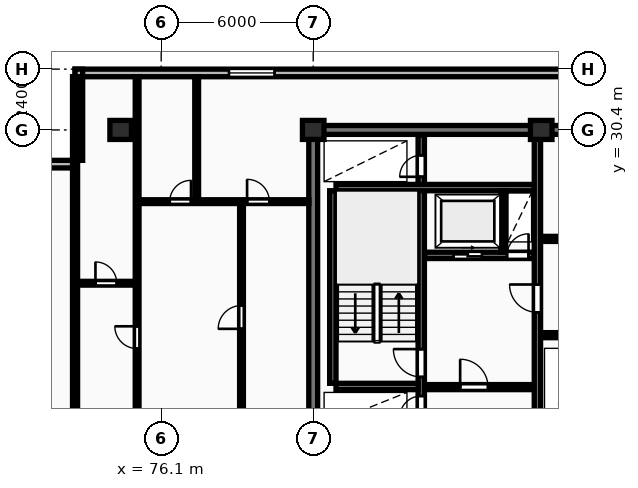
"""IFC4 building model, lengths in metres.
Left out: names, types, materials, properties, quantities, classifications, styles, units other than length and angle.
Written with IfcOpenShell. Run it as: python <this file> out.ifc"""

import sys

from ifc_helpers import new_model, si_unit, direction, frame, frame_2d, origin, origin_2d, place, context, subcontext, project, spatial, rectangle, extrude, element, fill, save


model = new_model("IFC4")
c1 = context("Model", 3, precision=1e-05, world=origin(), true_north=direction((0.0, 1.0)))
c2 = subcontext(c1, "Body", "Model", "MODEL_VIEW")
j1 = project(units=[si_unit("LENGTHUNIT", "METRE"), si_unit("PLANEANGLEUNIT", "RADIAN")], contexts=[c1])
p1 = place(None, origin())
s1 = spatial("IfcSite", under=j1, at=p1, CompositionType="ELEMENT")
p2 = place(p1, origin())
s2 = spatial("IfcBuilding", under=s1, at=p2, CompositionType="ELEMENT")
p3 = place(p2, frame((0.0, 0.0, 106.8)))
s3 = spatial("IfcBuildingStorey", under=s2, at=p3, CompositionType="ELEMENT", Elevation=106.8)
for number, where, z_axis, x_axis in (
    (1, (74.5, 30.4, 0.0), (0.0, 0.0, 1.0), (1.0, 0.0, 0.0)),
    (2, (82.1, 30.4, 0.0), (0.0, 0.0, 1.0), (1.0, 0.0, 0.0)),
    (3, (91.1, 30.4, 0.0), (0.0, 0.0, 1.0), (1.0, 0.0, 0.0)),
):
    element("IfcColumn", number, at=place(p3, frame(where, z_axis=z_axis, x_axis=x_axis)), inside=s3, PredefinedType="COLUMN", context=c2, shape_type="SweptSolid", body=[
        extrude(rectangle(XDim=0.85, YDim=0.75, at=origin_2d()), origin(), (0.0, 0.0, 1.0), 3.25),
    ])
p4 = place(p3, frame((130.7, 32.65, 0.0), z_axis=(0.0, 0.0, 1.0), x_axis=(-1.0, 0.0, 0.0)))
e4 = element("IfcWall", 4, at=p4, inside=s3, PredefinedType="STANDARD", context=c2, shape_type="SweptSolid", body=[
    extrude(rectangle(XDim=58.0, YDim=0.3, at=frame_2d((29.0, 0.0))), origin(), (0.0, 0.0, 1.0), 2.97),
])
p5 = place(p4, frame((50.125, 0.0, 0.85)))
e5 = element("IfcOpeningElement", 5, at=p5, cuts=e4, PredefinedType="OPENING", context=c2, shape_type="SweptSolid", body=[
    extrude(rectangle(XDim=1.8, YDim=1.8, at=frame_2d((0.9, 0.9))), frame((0.0, 0.16, 0.0), z_axis=(0.0, -1.0, 0.0), x_axis=(1.0, 0.0, 0.0)), (0.0, 0.0, 1.0), 0.32),
])
p6 = place(p4, frame((6.775, 0.0, 0.85)))
e6 = element("IfcOpeningElement", 6, at=p6, cuts=e4, PredefinedType="OPENING", context=c2, shape_type="SweptSolid", body=[
    extrude(rectangle(XDim=1.8, YDim=1.8, at=frame_2d((0.9, 0.9))), frame((0.0, 0.16, 0.0), z_axis=(0.0, -1.0, 0.0), x_axis=(1.0, 0.0, 0.0)), (0.0, 0.0, 1.0), 0.32),
])
p7 = place(p3, frame((72.85, 32.8, 0.0), z_axis=(0.0, 0.0, 1.0), x_axis=(0.0, -1.0, 0.0)))
e7 = element("IfcWall", 7, at=p7, inside=s3, PredefinedType="STANDARD", context=c2, shape_type="SweptSolid", body=[
    extrude(rectangle(XDim=3.6, YDim=0.3, at=frame_2d((1.8, 0.0))), origin(), (0.0, 0.0, 1.0), 2.97),
])
p8 = place(p3, frame((72.7, 29.05, 0.0), z_axis=(0.0, 0.0, 1.0), x_axis=(-1.0, 0.0, 0.0)))
e8 = element("IfcWall", 8, at=p8, inside=s3, PredefinedType="STANDARD", context=c2, shape_type="SweptSolid", body=[
    extrude(rectangle(XDim=3.6, YDim=0.3, at=frame_2d((1.8, 0.0))), origin(), (0.0, 0.0, 1.0), 2.97),
])
p9 = place(p3, frame((81.925, 30.4, 0.0), z_axis=(0.0, 0.0, 1.0), x_axis=(1.0, 0.0, 0.0)))
e9 = element("IfcWall", 9, at=p9, inside=s3, PredefinedType="SHEAR", context=c2, shape_type="SweptSolid", body=[
    extrude(rectangle(XDim=36.265, YDim=0.35, at=frame_2d((18.132, 0.0))), origin(), (0.0, 0.0, 1.0), 3.25),
])
p10 = place(p3, frame((82.1, 18.575, 0.0), z_axis=(0.0, 0.0, 1.0), x_axis=(0.0, 1.0, 0.0)))
e10 = element("IfcWall", 10, at=p10, inside=s3, PredefinedType="SHEAR", context=c2, shape_type="SweptSolid", body=[
    extrude(rectangle(XDim=11.65, YDim=0.35, at=frame_2d((5.825, 0.0))), origin(), (0.0, 0.0, 1.0), 3.25),
])
p11 = place(p3, frame((82.875, 20.4, 0.0), z_axis=(0.0, 0.0, 1.0), x_axis=(0.0, 1.0, 0.0)))
e11 = element("IfcWall", 11, at=p11, inside=s3, PredefinedType="SHEAR", context=c2, shape_type="SweptSolid", body=[
    extrude(rectangle(XDim=7.6, YDim=0.25, at=frame_2d((3.8, 0.0))), origin(), (0.0, 0.0, 1.0), 3.25),
])
p12 = place(p3, frame((86.365, 18.6, 0.0), z_axis=(0.0, 0.0, 1.0), x_axis=(0.0, 1.0, 0.0)))
e12 = element("IfcWall", 12, at=p12, inside=s3, PredefinedType="SHEAR", context=c2, shape_type="SweptSolid", body=[
    extrude(rectangle(XDim=11.6, YDim=0.25, at=frame_2d((5.8, 0.0))), origin(), (0.0, 0.0, 1.0), 3.25),
])
p13 = place(p12, frame((0.45, 0.0, 0.0)))
e13 = element("IfcOpeningElement", 13, at=p13, cuts=e12, PredefinedType="OPENING", context=c2, shape_type="SweptSolid", body=[
    extrude(rectangle(XDim=0.85, YDim=2.05, at=frame_2d((0.425, 1.025))), frame((0.0, 0.135, 0.0), z_axis=(0.0, -1.0, 0.0), x_axis=(1.0, 0.0, 0.0)), (0.0, 0.0, 1.0), 0.27),
])
p14 = place(p12, frame((2.05, 0.0, 0.0)))
e14 = element("IfcOpeningElement", 14, at=p14, cuts=e12, PredefinedType="OPENING", context=c2, shape_type="SweptSolid", body=[
    extrude(rectangle(XDim=1.1, YDim=2.1, at=frame_2d((0.55, 1.05))), frame((0.0, 0.135, 0.0), z_axis=(0.0, -1.0, 0.0), x_axis=(1.0, 0.0, 0.0)), (0.0, 0.0, 1.0), 0.27),
])
p15 = place(p12, frame((9.95, 0.0, 0.0)))
e15 = element("IfcOpeningElement", 15, at=p15, cuts=e12, PredefinedType="OPENING", context=c2, shape_type="SweptSolid", body=[
    extrude(rectangle(XDim=0.85, YDim=2.05, at=frame_2d((0.425, 1.025))), frame((0.0, 0.135, 0.0), z_axis=(0.0, -1.0, 0.0), x_axis=(1.0, 0.0, 0.0)), (0.0, 0.0, 1.0), 0.27),
])
p16 = place(p3, frame((83.0, 20.275, 0.0), z_axis=(0.0, 0.0, 1.0), x_axis=(1.0, 0.0, 0.0)))
e16 = element("IfcWall", 16, at=p16, inside=s3, PredefinedType="SHEAR", context=c2, shape_type="SweptSolid", body=[
    extrude(rectangle(XDim=3.24, YDim=0.25, at=frame_2d((1.62, 0.0))), origin(), (0.0, 0.0, 1.0), 3.25),
])
p17 = place(p3, frame((83.0, 28.125, 0.0), z_axis=(0.0, 0.0, 1.0), x_axis=(1.0, 0.0, 0.0)))
e17 = element("IfcWall", 17, at=p17, inside=s3, PredefinedType="SHEAR", context=c2, shape_type="SweptSolid", body=[
    extrude(rectangle(XDim=7.82, YDim=0.25, at=frame_2d((3.91, 0.0))), origin(), (0.0, 0.0, 1.0), 3.25),
])
p18 = place(p3, frame((86.5, 25.45, 0.0), z_axis=(0.0, 0.0, 1.0), x_axis=(1.0, 0.0, 0.0)))
e18 = element("IfcWall", 18, at=p18, inside=s3, PredefinedType="SHEAR", context=c2, shape_type="SweptSolid", body=[
    extrude(rectangle(XDim=4.32, YDim=0.25, at=frame_2d((2.16, 0.0))), origin(), (0.0, 0.0, 1.0), 3.25),
])
p19 = place(p18, frame((1.14, 0.0, 0.0)))
e19 = element("IfcOpeningElement", 19, at=p19, cuts=e18, PredefinedType="OPENING", context=c2, shape_type="SweptSolid", body=[
    extrude(rectangle(XDim=1.12, YDim=2.12, at=frame_2d((0.56, 1.06))), frame((0.0, 0.135, 0.0), z_axis=(0.0, -1.0, 0.0), x_axis=(1.0, 0.0, 0.0)), (0.0, 0.0, 1.0), 0.27),
])
p20 = place(p18, frame((3.25, 0.0, 0.0)))
e20 = element("IfcOpeningElement", 20, at=p20, cuts=e18, PredefinedType="OPENING", context=c2, shape_type="SweptSolid", body=[
    extrude(rectangle(XDim=0.85, YDim=2.05, at=frame_2d((0.425, 1.025))), frame((0.0, 0.135, 0.0), z_axis=(0.0, -1.0, 0.0), x_axis=(1.0, 0.0, 0.0)), (0.0, 0.0, 1.0), 0.27),
])
p21 = place(p3, frame((89.6, 25.58, 0.0), z_axis=(0.0, 0.0, 1.0), x_axis=(0.0, 1.0, 0.0)))
e21 = element("IfcWall", 21, at=p21, inside=s3, PredefinedType="PARTITIONING", context=c2, shape_type="SweptSolid", body=[
    extrude(rectangle(XDim=2.42, YDim=0.2, at=frame_2d((1.21, 0.0))), origin(), (0.0, 0.0, 1.0), 2.97),
])
p22 = place(p3, frame((86.5, 20.25, 0.0), z_axis=(0.0, 0.0, 1.0), x_axis=(1.0, 0.0, 0.0)))
e22 = element("IfcWall", 22, at=p22, inside=s3, PredefinedType="PARTITIONING", context=c2, shape_type="SweptSolid", body=[
    extrude(rectangle(XDim=4.32, YDim=0.2, at=frame_2d((2.16, 0.0))), origin(), (0.0, 0.0, 1.0), 2.97),
])
p23 = place(p22, frame((1.4, 0.0, 0.0)))
e23 = element("IfcOpeningElement", 23, at=p23, cuts=e22, PredefinedType="OPENING", context=c2, shape_type="SweptSolid", body=[
    extrude(rectangle(XDim=1.1, YDim=2.1, at=frame_2d((0.55, 1.05))), frame((0.0, 0.11, 0.0), z_axis=(0.0, -1.0, 0.0), x_axis=(1.0, 0.0, 0.0)), (0.0, 0.0, 1.0), 0.22),
])
p24 = place(p3, frame((90.95, 18.6, 0.0), z_axis=(0.0, 0.0, 1.0), x_axis=(0.0, 1.0, 0.0)))
e24 = element("IfcWall", 24, at=p24, inside=s3, PredefinedType="SHEAR", context=c2, shape_type="SweptSolid", body=[
    extrude(rectangle(XDim=11.6, YDim=0.25, at=frame_2d((5.8, 0.0))), origin(), (0.0, 0.0, 1.0), 3.25),
])
p25 = place(p24, frame((4.6, 0.0, 0.0)))
e25 = element("IfcOpeningElement", 25, at=p25, cuts=e24, PredefinedType="OPENING", context=c2, shape_type="SweptSolid", body=[
    extrude(rectangle(XDim=1.1, YDim=2.1, at=frame_2d((0.55, 1.05))), frame((0.0, 0.135, 0.0), z_axis=(0.0, -1.0, 0.0), x_axis=(1.0, 0.0, 0.0)), (0.0, 0.0, 1.0), 0.27),
])
p26 = place(p3, frame((91.08, 26.1, 0.0), z_axis=(0.0, 0.0, 1.0), x_axis=(1.0, 0.0, 0.0)))
e26 = element("IfcWall", 26, at=p26, inside=s3, PredefinedType="PARTITIONING", context=c2, shape_type="SweptSolid", body=[
    extrude(rectangle(XDim=8.34, YDim=0.2, at=frame_2d((4.17, 0.0))), origin(), (0.0, 0.0, 1.0), 2.97),
])
p27 = place(p26, frame((3.4, 0.0, 0.0)))
e27 = element("IfcOpeningElement", 27, at=p27, cuts=e26, PredefinedType="OPENING", context=c2, shape_type="SweptSolid", body=[
    extrude(rectangle(XDim=0.92, YDim=2.08, at=frame_2d((0.46, 1.04))), frame((0.0, 0.11, 0.0), z_axis=(0.0, -1.0, 0.0), x_axis=(1.0, 0.0, 0.0)), (0.0, 0.0, 1.0), 0.22),
])
p28 = place(p3, frame((91.08, 22.3, 0.0), z_axis=(0.0, 0.0, 1.0), x_axis=(1.0, 0.0, 0.0)))
e28 = element("IfcWall", 28, at=p28, inside=s3, PredefinedType="PARTITIONING", context=c2, shape_type="SweptSolid", body=[
    extrude(rectangle(XDim=19.14, YDim=0.2, at=frame_2d((9.57, 0.0))), origin(), (0.0, 0.0, 1.0), 2.97),
])
p29 = place(p28, frame((1.15, 0.0, 0.0)))
e29 = element("IfcOpeningElement", 29, at=p29, cuts=e28, PredefinedType="OPENING", context=c2, shape_type="SweptSolid", body=[
    extrude(rectangle(XDim=0.85, YDim=2.05, at=frame_2d((0.425, 1.025))), frame((0.0, 0.11, 0.0), z_axis=(0.0, -1.0, 0.0), x_axis=(1.0, 0.0, 0.0)), (0.0, 0.0, 1.0), 0.22),
])
p30 = place(p28, frame((3.2, 0.0, 0.0)))
e30 = element("IfcOpeningElement", 30, at=p30, cuts=e28, PredefinedType="OPENING", context=c2, shape_type="SweptSolid", body=[
    extrude(rectangle(XDim=0.85, YDim=2.05, at=frame_2d((0.425, 1.025))), frame((0.0, 0.11, 0.0), z_axis=(0.0, -1.0, 0.0), x_axis=(1.0, 0.0, 0.0)), (0.0, 0.0, 1.0), 0.22),
])
p31 = place(p28, frame((12.72, 0.0, 0.0)))
e31 = element("IfcOpeningElement", 31, at=p31, cuts=e28, PredefinedType="OPENING", context=c2, shape_type="SweptSolid", body=[
    extrude(rectangle(XDim=1.5, YDim=2.2, at=frame_2d((0.75, 1.1))), frame((0.0, 0.11, 0.0), z_axis=(0.0, -1.0, 0.0), x_axis=(1.0, 0.0, 0.0)), (0.0, 0.0, 1.0), 0.22),
])
p32 = place(p28, frame((5.52, 0.0, 0.0)))
e32 = element("IfcOpeningElement", 32, at=p32, cuts=e28, PredefinedType="OPENING", context=c2, shape_type="SweptSolid", body=[
    extrude(rectangle(XDim=0.88, YDim=2.06, at=frame_2d((0.44, 1.03))), frame((0.0, 0.11, 0.0), z_axis=(0.0, -1.0, 0.0), x_axis=(1.0, 0.0, 0.0)), (0.0, 0.0, 1.0), 0.22),
])
p33 = place(p28, frame((7.67, 0.0, 0.0)))
e33 = element("IfcOpeningElement", 33, at=p33, cuts=e28, PredefinedType="OPENING", context=c2, shape_type="SweptSolid", body=[
    extrude(rectangle(XDim=0.88, YDim=2.06, at=frame_2d((0.44, 1.03))), frame((0.0, 0.11, 0.0), z_axis=(0.0, -1.0, 0.0), x_axis=(1.0, 0.0, 0.0)), (0.0, 0.0, 1.0), 0.22),
])
p34 = place(p28, frame((10.27, 0.0, 0.0)))
e34 = element("IfcOpeningElement", 34, at=p34, cuts=e28, PredefinedType="OPENING", context=c2, shape_type="SweptSolid", body=[
    extrude(rectangle(XDim=0.85, YDim=2.05, at=frame_2d((0.425, 1.025))), frame((0.0, 0.11, 0.0), z_axis=(0.0, -1.0, 0.0), x_axis=(1.0, 0.0, 0.0)), (0.0, 0.0, 1.0), 0.22),
])
p35 = place(p28, frame((15.92, 0.0, 0.0)))
e35 = element("IfcOpeningElement", 35, at=p35, cuts=e28, PredefinedType="OPENING", context=c2, shape_type="SweptSolid", body=[
    extrude(rectangle(XDim=0.96, YDim=2.1, at=frame_2d((0.48, 1.05))), frame((0.0, 0.11, 0.0), z_axis=(0.0, -1.0, 0.0), x_axis=(1.0, 0.0, 0.0)), (0.0, 0.0, 1.0), 0.22),
])
p36 = place(p3, frame((72.7, 18.4, 0.0), z_axis=(0.0, 0.0, 1.0), x_axis=(0.0, 1.0, 0.0)))
e36 = element("IfcWall", 36, at=p36, inside=s3, PredefinedType="PARTITIONING", context=c2, shape_type="SweptSolid", body=[
    extrude(rectangle(XDim=14.1, YDim=0.2, at=frame_2d((7.05, 0.0))), origin(), (0.0, 0.0, 1.0), 2.97),
])
p37 = place(p3, frame((72.7, 24.35, 0.0), z_axis=(0.0, 0.0, 1.0), x_axis=(1.0, 0.0, 0.0)))
e37 = element("IfcWall", 37, at=p37, inside=s3, PredefinedType="PARTITIONING", context=c2, shape_type="SweptSolid", body=[
    extrude(rectangle(XDim=2.45, YDim=0.15, at=frame_2d((1.225, 0.0))), origin(), (0.0, 0.0, 1.0), 2.97),
])
p38 = place(p37, frame((0.805, 0.0, 0.0)))
e38 = element("IfcOpeningElement", 38, at=p38, cuts=e37, PredefinedType="OPENING", context=c2, shape_type="SweptSolid", body=[
    extrude(rectangle(XDim=0.84, YDim=2.04, at=frame_2d((0.42, 1.02))), frame((0.0, 0.085, 0.0), z_axis=(0.0, -1.0, 0.0), x_axis=(1.0, 0.0, 0.0)), (0.0, 0.0, 1.0), 0.17),
])
p39 = place(p3, frame((75.15, 18.45, 0.0), z_axis=(0.0, 0.0, 1.0), x_axis=(0.0, 1.0, 0.0)))
e39 = element("IfcWall", 39, at=p39, inside=s3, PredefinedType="PARTITIONING", context=c2, shape_type="SweptSolid", body=[
    extrude(rectangle(XDim=14.05, YDim=0.15, at=frame_2d((7.025, 0.0))), origin(), (0.0, 0.0, 1.0), 2.97),
])
p40 = place(p39, frame((3.32, 0.0, 0.0)))
e40 = element("IfcOpeningElement", 40, at=p40, cuts=e39, PredefinedType="OPENING", context=c2, shape_type="SweptSolid", body=[
    extrude(rectangle(XDim=0.88, YDim=2.06, at=frame_2d((0.44, 1.03))), frame((0.0, 0.085, 0.0), z_axis=(0.0, -1.0, 0.0), x_axis=(1.0, 0.0, 0.0)), (0.0, 0.0, 1.0), 0.17),
])
p41 = place(p3, frame((79.27, 18.45, 0.0), z_axis=(0.0, 0.0, 1.0), x_axis=(0.0, 1.0, 0.0)))
e41 = element("IfcWall", 41, at=p41, inside=s3, PredefinedType="PARTITIONING", context=c2, shape_type="SweptSolid", body=[
    extrude(rectangle(XDim=9.12, YDim=0.15, at=frame_2d((4.56, 0.0))), origin(), (0.0, 0.0, 1.0), 2.97),
])
p42 = place(p41, frame((4.1, 0.0, 0.0)))
e42 = element("IfcOpeningElement", 42, at=p42, cuts=e41, PredefinedType="OPENING", context=c2, shape_type="SweptSolid", body=[
    extrude(rectangle(XDim=0.92, YDim=2.08, at=frame_2d((0.46, 1.04))), frame((0.0, 0.085, 0.0), z_axis=(0.0, -1.0, 0.0), x_axis=(1.0, 0.0, 0.0)), (0.0, 0.0, 1.0), 0.17),
])
p43 = place(p3, frame((77.5, 27.57, 0.0), z_axis=(0.0, 0.0, 1.0), x_axis=(0.0, 1.0, 0.0)))
e43 = element("IfcWall", 43, at=p43, inside=s3, PredefinedType="PARTITIONING", context=c2, shape_type="SweptSolid", body=[
    extrude(rectangle(XDim=4.93, YDim=0.15, at=frame_2d((2.465, 0.0))), origin(), (0.0, 0.0, 1.0), 2.97),
])
p44 = place(p3, frame((75.17, 27.57, 0.0), z_axis=(0.0, 0.0, 1.0), x_axis=(1.0, 0.0, 0.0)))
e44 = element("IfcWall", 44, at=p44, inside=s3, PredefinedType="PARTITIONING", context=c2, shape_type="SweptSolid", body=[
    extrude(rectangle(XDim=6.76, YDim=0.15, at=frame_2d((3.38, 0.0))), origin(), (0.0, 0.0, 1.0), 2.97),
])
p45 = place(p44, frame((1.266, 0.0, 0.0)))
e45 = element("IfcOpeningElement", 45, at=p45, cuts=e44, PredefinedType="OPENING", context=c2, shape_type="SweptSolid", body=[
    extrude(rectangle(XDim=0.84, YDim=2.04, at=frame_2d((0.42, 1.02))), frame((0.0, 0.085, 0.0), z_axis=(0.0, -1.0, 0.0), x_axis=(1.0, 0.0, 0.0)), (0.0, 0.0, 1.0), 0.17),
])
p46 = place(p44, frame((4.32, 0.0, 0.0)))
e46 = element("IfcOpeningElement", 46, at=p46, cuts=e44, PredefinedType="OPENING", context=c2, shape_type="SweptSolid", body=[
    extrude(rectangle(XDim=0.88, YDim=2.06, at=frame_2d((0.44, 1.03))), frame((0.0, 0.085, 0.0), z_axis=(0.0, -1.0, 0.0), x_axis=(1.0, 0.0, 0.0)), (0.0, 0.0, 1.0), 0.17),
])
p47 = place(p5, origin())
e47 = element("IfcWindow", 47, at=p47, inside=s3, PartitioningType="SINGLE_PANEL", PredefinedType="WINDOW", context=c2, shape_type="SweptSolid", body=[
    extrude(rectangle(XDim=1.8, YDim=1.8, at=frame_2d((0.9, 0.9))), frame((0.0, 0.03, 0.0), z_axis=(0.0, -1.0, 0.0), x_axis=(1.0, 0.0, 0.0)), (0.0, 0.0, 1.0), 0.06),
])
fill(e5, e47)
p48 = place(p13, origin())
e48 = element("IfcDoor", 48, at=p48, inside=s3, OperationType="SINGLE_SWING_LEFT", PredefinedType="DOOR", context=c2, shape_type="SweptSolid", body=[
    extrude(rectangle(XDim=0.85, YDim=2.05, at=frame_2d((0.425, 1.025))), frame((0.0, 0.025, 0.0), z_axis=(0.0, -1.0, 0.0), x_axis=(1.0, 0.0, 0.0)), (0.0, 0.0, 1.0), 0.05),
])
fill(e13, e48)
p49 = place(p14, origin())
e49 = element("IfcDoor", 49, at=p49, inside=s3, OperationType="SINGLE_SWING_RIGHT", PredefinedType="DOOR", context=c2, shape_type="SweptSolid", body=[
    extrude(rectangle(XDim=1.1, YDim=2.1, at=frame_2d((0.55, 1.05))), frame((0.0, 0.025, 0.0), z_axis=(0.0, -1.0, 0.0), x_axis=(1.0, 0.0, 0.0)), (0.0, 0.0, 1.0), 0.05),
])
fill(e14, e49)
p50 = place(p15, origin())
e50 = element("IfcDoor", 50, at=p50, inside=s3, OperationType="SINGLE_SWING_LEFT", PredefinedType="DOOR", context=c2, shape_type="SweptSolid", body=[
    extrude(rectangle(XDim=0.85, YDim=2.05, at=frame_2d((0.425, 1.025))), frame((0.0, 0.025, 0.0), z_axis=(0.0, -1.0, 0.0), x_axis=(1.0, 0.0, 0.0)), (0.0, 0.0, 1.0), 0.05),
])
fill(e15, e50)
p51 = place(p19, origin())
e51 = element("IfcDoor", 51, at=p51, inside=s3, OperationType="SLIDING_TO_RIGHT", PredefinedType="DOOR", context=c2, shape_type="SweptSolid", body=[
    extrude(rectangle(XDim=1.12, YDim=2.12, at=frame_2d((0.56, 1.06))), frame((0.0, 0.025, 0.0), z_axis=(0.0, -1.0, 0.0), x_axis=(1.0, 0.0, 0.0)), (0.0, 0.0, 1.0), 0.05),
])
fill(e19, e51)
p52 = place(p20, origin())
e52 = element("IfcDoor", 52, at=p52, inside=s3, OperationType="SINGLE_SWING_RIGHT", PredefinedType="DOOR", context=c2, shape_type="SweptSolid", body=[
    extrude(rectangle(XDim=0.85, YDim=2.05, at=frame_2d((0.425, 1.025))), frame((0.0, 0.025, 0.0), z_axis=(0.0, -1.0, 0.0), x_axis=(1.0, 0.0, 0.0)), (0.0, 0.0, 1.0), 0.05),
])
fill(e20, e52)
p53 = place(p23, origin())
e53 = element("IfcDoor", 53, at=p53, inside=s3, OperationType="SINGLE_SWING_LEFT", PredefinedType="DOOR", context=c2, shape_type="SweptSolid", body=[
    extrude(rectangle(XDim=1.1, YDim=2.1, at=frame_2d((0.55, 1.05))), frame((0.0, 0.025, 0.0), z_axis=(0.0, -1.0, 0.0), x_axis=(1.0, 0.0, 0.0)), (0.0, 0.0, 1.0), 0.05),
])
fill(e23, e53)
p54 = place(p25, origin())
e54 = element("IfcDoor", 54, at=p54, inside=s3, OperationType="SINGLE_SWING_RIGHT", PredefinedType="DOOR", context=c2, shape_type="SweptSolid", body=[
    extrude(rectangle(XDim=1.1, YDim=2.1, at=frame_2d((0.55, 1.05))), frame((0.0, 0.025, 0.0), z_axis=(0.0, -1.0, 0.0), x_axis=(1.0, 0.0, 0.0)), (0.0, 0.0, 1.0), 0.05),
])
fill(e25, e54)
p55 = place(p38, origin())
e55 = element("IfcDoor", 55, at=p55, inside=s3, OperationType="SINGLE_SWING_LEFT", PredefinedType="DOOR", context=c2, shape_type="SweptSolid", body=[
    extrude(rectangle(XDim=0.84, YDim=2.04, at=frame_2d((0.42, 1.02))), frame((0.0, 0.025, 0.0), z_axis=(0.0, -1.0, 0.0), x_axis=(1.0, 0.0, 0.0)), (0.0, 0.0, 1.0), 0.05),
])
fill(e38, e55)
p56 = place(p40, origin())
e56 = element("IfcDoor", 56, at=p56, inside=s3, OperationType="SINGLE_SWING_RIGHT", PredefinedType="DOOR", context=c2, shape_type="SweptSolid", body=[
    extrude(rectangle(XDim=0.88, YDim=2.06, at=frame_2d((0.44, 1.03))), frame((0.0, 0.025, 0.0), z_axis=(0.0, -1.0, 0.0), x_axis=(1.0, 0.0, 0.0)), (0.0, 0.0, 1.0), 0.05),
])
fill(e40, e56)
p57 = place(p42, origin())
e57 = element("IfcDoor", 57, at=p57, inside=s3, OperationType="SINGLE_SWING_LEFT", PredefinedType="DOOR", context=c2, shape_type="SweptSolid", body=[
    extrude(rectangle(XDim=0.92, YDim=2.08, at=frame_2d((0.46, 1.04))), frame((0.0, 0.025, 0.0), z_axis=(0.0, -1.0, 0.0), x_axis=(1.0, 0.0, 0.0)), (0.0, 0.0, 1.0), 0.05),
])
fill(e42, e57)
p58 = place(p45, origin())
e58 = element("IfcDoor", 58, at=p58, inside=s3, OperationType="SINGLE_SWING_RIGHT", PredefinedType="DOOR", context=c2, shape_type="SweptSolid", body=[
    extrude(rectangle(XDim=0.84, YDim=2.04, at=frame_2d((0.42, 1.02))), frame((0.0, 0.025, 0.0), z_axis=(0.0, -1.0, 0.0), x_axis=(1.0, 0.0, 0.0)), (0.0, 0.0, 1.0), 0.05),
])
fill(e45, e58)
p59 = place(p46, origin())
e59 = element("IfcDoor", 59, at=p59, inside=s3, OperationType="SINGLE_SWING_LEFT", PredefinedType="DOOR", context=c2, shape_type="SweptSolid", body=[
    extrude(rectangle(XDim=0.88, YDim=2.06, at=frame_2d((0.44, 1.03))), frame((0.0, 0.025, 0.0), z_axis=(0.0, -1.0, 0.0), x_axis=(1.0, 0.0, 0.0)), (0.0, 0.0, 1.0), 0.05),
])
fill(e46, e59)
save(model, sys.argv[1])
